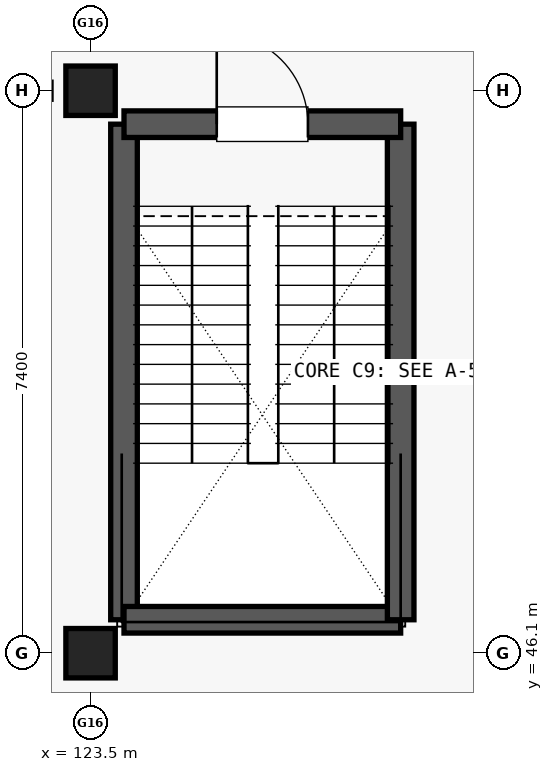
"""IFC4 building model, lengths in metres.
Left out: names, types, materials, properties, quantities, classifications, styles, units other than length and angle.
Written with IfcOpenShell. Run it as: python <this file> out.ifc"""

import sys

from ifc_helpers import new_model, si_unit, direction, frame, frame_2d, origin, origin_2d, place, context, subcontext, project, spatial, rectangle, extrude, element, fill, save


model = new_model("IFC4")
c1 = context("Model", 3, precision=1e-05, world=origin(), true_north=direction((0.0, 1.0)))
c2 = subcontext(c1, "Body", "Model", "MODEL_VIEW")
j1 = project(units=[si_unit("LENGTHUNIT", "METRE"), si_unit("PLANEANGLEUNIT", "RADIAN")], contexts=[c1])
p1 = place(None, origin())
s1 = spatial("IfcSite", under=j1, at=p1, CompositionType="ELEMENT")
p2 = place(p1, origin())
s2 = spatial("IfcBuilding", under=s1, at=p2, CompositionType="ELEMENT")
p3 = place(p2, frame((0.0, 0.0, 5.4)))
s3 = spatial("IfcBuildingStorey", under=s2, at=p3, CompositionType="ELEMENT", Elevation=5.4)
for number, where, z_axis, x_axis in (
    (1, (123.5, 46.1, 0.0), (0.0, 0.0, 1.0), (1.0, 0.0, 0.0)),
    (2, (123.5, 53.5, 0.0), (0.0, 0.0, 1.0), (1.0, 0.0, 0.0)),
):
    element("IfcColumn", number, at=place(p3, frame(where, z_axis=z_axis, x_axis=x_axis)), inside=s3, PredefinedType="COLUMN", context=c2, shape_type="SweptSolid", body=[
        extrude(rectangle(XDim=0.65, YDim=0.65, at=origin_2d()), origin(), (0.0, 0.0, 1.0), 4.56),
    ])
p4 = place(p3, frame((123.94, 46.54, 0.0), z_axis=(0.0, 0.0, 1.0), x_axis=(0.0, 1.0, 0.0)))
e3 = element("IfcWall", 3, at=p4, inside=s3, PredefinedType="SHEAR", context=c2, shape_type="SweptSolid", body=[
    extrude(rectangle(XDim=6.52, YDim=0.35, at=frame_2d((3.26, 0.0))), origin(), (0.0, 0.0, 1.0), 4.555),
])
p5 = place(p3, frame((123.94, 46.54, 0.0), z_axis=(0.0, 0.0, 1.0), x_axis=(1.0, 0.0, 0.0)))
e4 = element("IfcWall", 4, at=p5, inside=s3, PredefinedType="SHEAR", context=c2, shape_type="SweptSolid", body=[
    extrude(rectangle(XDim=3.64, YDim=0.35, at=frame_2d((1.82, 0.0))), origin(), (0.0, 0.0, 1.0), 4.555),
])
p6 = place(p3, frame((127.58, 46.54, 0.0), z_axis=(0.0, 0.0, 1.0), x_axis=(0.0, 1.0, 0.0)))
e5 = element("IfcWall", 5, at=p6, inside=s3, PredefinedType="SHEAR", context=c2, shape_type="SweptSolid", body=[
    extrude(rectangle(XDim=6.52, YDim=0.35, at=frame_2d((3.26, 0.0))), origin(), (0.0, 0.0, 1.0), 4.555),
])
p7 = place(p3, frame((123.94, 53.06, 0.0), z_axis=(0.0, 0.0, 1.0), x_axis=(1.0, 0.0, 0.0)))
e6 = element("IfcWall", 6, at=p7, inside=s3, PredefinedType="SHEAR", context=c2, shape_type="SweptSolid", body=[
    extrude(rectangle(XDim=3.64, YDim=0.35, at=frame_2d((1.82, 0.0))), origin(), (0.0, 0.0, 1.0), 4.555),
])
p8 = place(p7, frame((1.22, 0.0, 0.0)))
e7 = element("IfcOpeningElement", 7, at=p8, cuts=e6, PredefinedType="OPENING", context=c2, shape_type="SweptSolid", body=[
    extrude(rectangle(XDim=1.2, YDim=2.15, at=frame_2d((0.6, 1.075))), frame((0.0, 0.185, 0.0), z_axis=(0.0, -1.0, 0.0), x_axis=(1.0, 0.0, 0.0)), (0.0, 0.0, 1.0), 0.37),
])
p9 = place(p8, origin())
e8 = element("IfcDoor", 8, at=p9, inside=s3, OperationType="SINGLE_SWING_LEFT", PredefinedType="DOOR", context=c2, shape_type="SweptSolid", body=[
    extrude(rectangle(XDim=1.2, YDim=2.15, at=frame_2d((0.6, 1.075))), frame((0.0, 0.025, 0.0), z_axis=(0.0, -1.0, 0.0), x_axis=(1.0, 0.0, 0.0)), (0.0, 0.0, 1.0), 0.05),
])
fill(e7, e8)
save(model, sys.argv[1])
